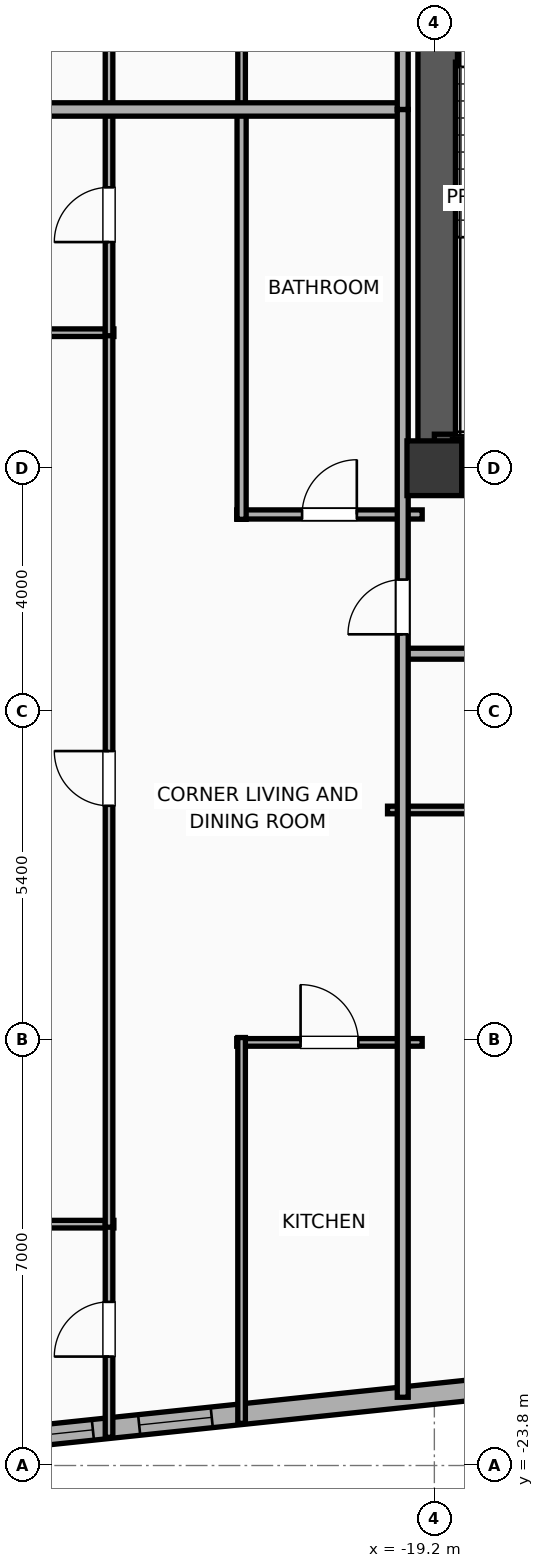
"""IFC4 building model, lengths in metres.
Left out: names, types, materials, properties, quantities, classifications, styles, units other than length and angle.
Written with IfcOpenShell. Run it as: python <this file> out.ifc"""

import sys

from ifc_helpers import new_model, si_unit, direction, frame, frame_2d, origin, origin_2d, place, context, subcontext, project, spatial, rectangle, extrude, element, fill, save


model = new_model("IFC4")
c1 = context("Model", 3, precision=1e-05, world=origin(), true_north=direction((0.0, 1.0)))
c2 = subcontext(c1, "Body", "Model", "MODEL_VIEW")
j1 = project(units=[si_unit("LENGTHUNIT", "METRE"), si_unit("PLANEANGLEUNIT", "RADIAN")], contexts=[c1])
p1 = place(None, origin())
s1 = spatial("IfcSite", under=j1, at=p1, CompositionType="ELEMENT")
p2 = place(p1, origin())
s2 = spatial("IfcBuilding", under=s1, at=p2, CompositionType="ELEMENT")
p3 = place(p2, frame((0.0, 0.0, 163.8)))
s3 = spatial("IfcBuildingStorey", under=s2, at=p3, CompositionType="ELEMENT", Elevation=163.8)
p4 = place(p3, frame((-19.2, -7.4, 0.0), z_axis=(0.0, 0.0, 1.0), x_axis=(1.0, 0.0, 0.0)))
e1 = element("IfcColumn", 1, at=p4, inside=s3, PredefinedType="COLUMN", context=c2, shape_type="SweptSolid", body=[
    extrude(rectangle(XDim=0.9, YDim=0.9, at=origin_2d()), origin(), (0.0, 0.0, 1.0), 3.9),
])
p5 = place(p3, frame((-19.425, -7.4, 0.0), z_axis=(0.0, 0.0, 1.0), x_axis=(1.0, 0.0, 0.0)))
e2 = element("IfcWall", 2, at=p5, inside=s3, PredefinedType="SHEAR", context=c2, shape_type="SweptSolid", body=[
    extrude(rectangle(XDim=7.25, YDim=0.45, at=frame_2d((3.625, 0.0))), origin(), (0.0, 0.0, 1.0), 3.65),
])
p6 = place(p3, frame((-19.145, -7.4, 0.0), z_axis=(0.0, 0.0, 1.0), x_axis=(0.0, 1.0, 0.0)))
e3 = element("IfcWall", 3, at=p6, inside=s3, PredefinedType="SHEAR", context=c2, shape_type="SweptSolid", body=[
    extrude(rectangle(XDim=14.8, YDim=0.65, at=frame_2d((7.4, 0.0))), origin(), (0.0, 0.0, 1.0), 3.65),
])
p7 = place(p3, frame((-19.2, -6.965, 0.0), z_axis=(0.0, 0.0, 1.0), x_axis=(1.0, 0.0, 0.0)))
e4 = element("IfcWall", 4, at=p7, inside=s3, PredefinedType="SOLIDWALL", context=c2, shape_type="SweptSolid", body=[
    extrude(rectangle(XDim=3.46, YDim=0.25, at=frame_2d((1.73, 0.0))), origin(), (0.0, 0.0, 1.0), 3.65),
])
p8 = place(p3, frame((24.756, -18.003, 0.0), z_axis=(0.0, 0.0, 1.0), x_axis=(-0.99452160744, -0.104531202687, 0.0)))
e5 = element("IfcWall", 5, at=p8, inside=s3, PredefinedType="ELEMENTEDWALL", context=c2, shape_type="SweptSolid", body=[
    extrude(rectangle(XDim=51.967, YDim=0.34, at=frame_2d((25.983, 0.0))), origin(), (0.0, 0.0, 1.0), 3.65),
])
p9 = place(p8, frame((25.633, 0.0, 0.75)))
e6 = element("IfcOpeningElement", 6, at=p9, cuts=e5, PredefinedType="OPENING", context=c2, shape_type="SweptSolid", body=[
    extrude(rectangle(XDim=2.4, YDim=2.1, at=frame_2d((1.2, 1.05))), frame((0.0, 0.18, 0.0), z_axis=(0.0, -1.0, 0.0), x_axis=(1.0, 0.0, 0.0)), (0.0, 0.0, 1.0), 0.36),
])
p10 = place(p8, frame((42.369, 0.0, 0.75)))
e7 = element("IfcOpeningElement", 7, at=p10, cuts=e5, PredefinedType="OPENING", context=c2, shape_type="SweptSolid", body=[
    extrude(rectangle(XDim=1.2, YDim=2.05, at=frame_2d((0.6, 1.025))), frame((0.0, 0.18, 0.0), z_axis=(0.0, -1.0, 0.0), x_axis=(1.0, 0.0, 0.0)), (0.0, 0.0, 1.0), 0.36),
])
p11 = place(p8, frame((34.085, 0.0, 0.75)))
e8 = element("IfcOpeningElement", 8, at=p11, cuts=e5, PredefinedType="OPENING", context=c2, shape_type="SweptSolid", body=[
    extrude(rectangle(XDim=1.2, YDim=2.05, at=frame_2d((0.6, 1.025))), frame((0.0, 0.18, 0.0), z_axis=(0.0, -1.0, 0.0), x_axis=(1.0, 0.0, 0.0)), (0.0, 0.0, 1.0), 0.36),
])
p12 = place(p8, frame((36.993, 0.0, 0.75)))
e9 = element("IfcOpeningElement", 9, at=p12, cuts=e5, PredefinedType="OPENING", context=c2, shape_type="SweptSolid", body=[
    extrude(rectangle(XDim=1.2, YDim=2.05, at=frame_2d((0.6, 1.025))), frame((0.0, 0.18, 0.0), z_axis=(0.0, -1.0, 0.0), x_axis=(1.0, 0.0, 0.0)), (0.0, 0.0, 1.0), 0.36),
])
p13 = place(p8, frame((14.397, 0.0, 0.75)))
e10 = element("IfcOpeningElement", 10, at=p13, cuts=e5, PredefinedType="OPENING", context=c2, shape_type="SweptSolid", body=[
    extrude(rectangle(XDim=1.2, YDim=2.05, at=frame_2d((0.6, 1.025))), frame((0.0, 0.18, 0.0), z_axis=(0.0, -1.0, 0.0), x_axis=(1.0, 0.0, 0.0)), (0.0, 0.0, 1.0), 0.36),
])
p14 = place(p8, frame((11.489, 0.0, 0.75)))
e11 = element("IfcOpeningElement", 11, at=p14, cuts=e5, PredefinedType="OPENING", context=c2, shape_type="SweptSolid", body=[
    extrude(rectangle(XDim=1.2, YDim=2.05, at=frame_2d((0.6, 1.025))), frame((0.0, 0.18, 0.0), z_axis=(0.0, -1.0, 0.0), x_axis=(1.0, 0.0, 0.0)), (0.0, 0.0, 1.0), 0.36),
])
p15 = place(p8, frame((8.521, 0.0, 0.75)))
e12 = element("IfcOpeningElement", 12, at=p15, cuts=e5, PredefinedType="OPENING", context=c2, shape_type="SweptSolid", body=[
    extrude(rectangle(XDim=1.2, YDim=2.05, at=frame_2d((0.6, 1.025))), frame((0.0, 0.18, 0.0), z_axis=(0.0, -1.0, 0.0), x_axis=(1.0, 0.0, 0.0)), (0.0, 0.0, 1.0), 0.36),
])
p16 = place(p8, frame((5.582, 0.0, 0.75)))
e13 = element("IfcOpeningElement", 13, at=p16, cuts=e5, PredefinedType="OPENING", context=c2, shape_type="SweptSolid", body=[
    extrude(rectangle(XDim=1.2, YDim=2.05, at=frame_2d((0.6, 1.025))), frame((0.0, 0.18, 0.0), z_axis=(0.0, -1.0, 0.0), x_axis=(1.0, 0.0, 0.0)), (0.0, 0.0, 1.0), 0.36),
])
p17 = place(p8, frame((29.313, 0.0, 0.75)))
e14 = element("IfcOpeningElement", 14, at=p17, cuts=e5, PredefinedType="OPENING", context=c2, shape_type="SweptSolid", body=[
    extrude(rectangle(XDim=1.2, YDim=2.05, at=frame_2d((0.6, 1.025))), frame((0.0, 0.18, 0.0), z_axis=(0.0, -1.0, 0.0), x_axis=(1.0, 0.0, 0.0)), (0.0, 0.0, 1.0), 0.36),
])
p18 = place(p8, frame((22.248, 0.0, 0.75)))
e15 = element("IfcOpeningElement", 15, at=p18, cuts=e5, PredefinedType="OPENING", context=c2, shape_type="SweptSolid", body=[
    extrude(rectangle(XDim=1.2, YDim=2.05, at=frame_2d((0.6, 1.025))), frame((0.0, 0.18, 0.0), z_axis=(0.0, -1.0, 0.0), x_axis=(1.0, 0.0, 0.0)), (0.0, 0.0, 1.0), 0.36),
])
p19 = place(p8, frame((18.186, 0.0, 0.75)))
e16 = element("IfcOpeningElement", 16, at=p19, cuts=e5, PredefinedType="OPENING", context=c2, shape_type="SweptSolid", body=[
    extrude(rectangle(XDim=1.2, YDim=2.05, at=frame_2d((0.6, 1.025))), frame((0.0, 0.18, 0.0), z_axis=(0.0, -1.0, 0.0), x_axis=(1.0, 0.0, 0.0)), (0.0, 0.0, 1.0), 0.36),
])
p20 = place(p8, frame((47.879, 0.0, 0.75)))
e17 = element("IfcOpeningElement", 17, at=p20, cuts=e5, PredefinedType="OPENING", context=c2, shape_type="SweptSolid", body=[
    extrude(rectangle(XDim=1.2, YDim=2.05, at=frame_2d((0.6, 1.025))), frame((0.0, 0.18, 0.0), z_axis=(0.0, -1.0, 0.0), x_axis=(1.0, 0.0, 0.0)), (0.0, 0.0, 1.0), 0.36),
])
p21 = place(p8, frame((49.844, 0.0, 0.75)))
e18 = element("IfcOpeningElement", 18, at=p21, cuts=e5, PredefinedType="OPENING", context=c2, shape_type="SweptSolid", body=[
    extrude(rectangle(XDim=1.2, YDim=2.05, at=frame_2d((0.6, 1.025))), frame((0.0, 0.18, 0.0), z_axis=(0.0, -1.0, 0.0), x_axis=(1.0, 0.0, 0.0)), (0.0, 0.0, 1.0), 0.36),
])
p22 = place(p3, frame((-19.97, -13.02, 0.0), z_axis=(0.0, 0.0, 1.0), x_axis=(1.0, 0.0, 0.0)))
e19 = element("IfcWall", 19, at=p22, inside=s3, PredefinedType="PARTITIONING", context=c2, shape_type="SweptSolid", body=[
    extrude(rectangle(XDim=2.63, YDim=0.125, at=frame_2d((1.315, 0.0))), origin(), (0.0, 0.0, 1.0), 3.65),
])
p23 = place(p3, frame((-19.75, -10.45, 0.0), z_axis=(0.0, 0.0, 1.0), x_axis=(1.0, 0.0, 0.0)))
e20 = element("IfcWall", 20, at=p23, inside=s3, PredefinedType="PARTITIONING", context=c2, shape_type="SweptSolid", body=[
    extrude(rectangle(XDim=11.67, YDim=0.18, at=frame_2d((5.835, 0.0))), origin(), (0.0, 0.0, 1.0), 3.65),
])
p24 = place(p23, frame((2.664, 0.0, 0.0)))
e21 = element("IfcOpeningElement", 21, at=p24, cuts=e20, PredefinedType="OPENING", context=c2, shape_type="SweptSolid", body=[
    extrude(rectangle(XDim=0.9, YDim=2.05, at=frame_2d((0.45, 1.025))), frame((0.0, 0.1, 0.0), z_axis=(0.0, -1.0, 0.0), x_axis=(1.0, 0.0, 0.0)), (0.0, 0.0, 1.0), 0.2),
])
p25 = place(p23, frame((9.404, 0.0, 0.0)))
e22 = element("IfcOpeningElement", 22, at=p25, cuts=e20, PredefinedType="OPENING", context=c2, shape_type="SweptSolid", body=[
    extrude(rectangle(XDim=1.15, YDim=2.05, at=frame_2d((0.575, 1.025))), frame((0.0, 0.1, 0.0), z_axis=(0.0, -1.0, 0.0), x_axis=(1.0, 0.0, 0.0)), (0.0, 0.0, 1.0), 0.2),
])
p26 = place(p3, frame((-31.123, -19.831, 0.0), z_axis=(0.0, 0.0, 1.0), x_axis=(1.0, 0.0, 0.0)))
e23 = element("IfcWall", 23, at=p26, inside=s3, PredefinedType="PARTITIONING", context=c2, shape_type="SweptSolid", body=[
    extrude(rectangle(XDim=6.653, YDim=0.125, at=frame_2d((3.326, 0.0))), origin(), (0.0, 0.0, 1.0), 3.65),
])
p27 = place(p3, frame((-32.664, -5.171, 0.0), z_axis=(0.0, 0.0, 1.0), x_axis=(1.0, 0.0, 0.0)))
e24 = element("IfcWall", 24, at=p27, inside=s3, PredefinedType="PARTITIONING", context=c2, shape_type="SweptSolid", body=[
    extrude(rectangle(XDim=8.194, YDim=0.125, at=frame_2d((4.097, 0.0))), origin(), (0.0, 0.0, 1.0), 3.65),
])
p28 = place(p3, frame((-24.55, -23.336, 0.0), z_axis=(0.0, 0.0, 1.0), x_axis=(0.0, 1.0, 0.0)))
e25 = element("IfcWall", 25, at=p28, inside=s3, PredefinedType="PARTITIONING", context=c2, shape_type="SweptSolid", body=[
    extrude(rectangle(XDim=3.555, YDim=0.125, at=frame_2d((1.778, 0.0))), origin(), (0.0, 0.0, 1.0), 3.65),
])
p29 = place(p28, frame((1.328, 0.0, 0.0)))
e26 = element("IfcOpeningElement", 26, at=p29, cuts=e25, PredefinedType="OPENING", context=c2, shape_type="SweptSolid", body=[
    extrude(rectangle(XDim=0.9, YDim=2.05, at=frame_2d((0.45, 1.025))), frame((0.0, 0.073, 0.0), z_axis=(0.0, -1.0, 0.0), x_axis=(1.0, 0.0, 0.0)), (0.0, 0.0, 1.0), 0.145),
])
p30 = place(p3, frame((-24.55, -19.881, 0.0), z_axis=(0.0, 0.0, 1.0), x_axis=(0.0, 1.0, 0.0)))
e27 = element("IfcWall", 27, at=p30, inside=s3, PredefinedType="PARTITIONING", context=c2, shape_type="SweptSolid", body=[
    extrude(rectangle(XDim=14.76, YDim=0.125, at=frame_2d((7.38, 0.0))), origin(), (0.0, 0.0, 1.0), 3.65),
])
p31 = place(p30, frame((6.93, 0.0, 0.0)))
e28 = element("IfcOpeningElement", 28, at=p31, cuts=e27, PredefinedType="OPENING", context=c2, shape_type="SweptSolid", body=[
    extrude(rectangle(XDim=0.9, YDim=2.05, at=frame_2d((0.45, 1.025))), frame((0.0, 0.073, 0.0), z_axis=(0.0, -1.0, 0.0), x_axis=(1.0, 0.0, 0.0)), (0.0, 0.0, 1.0), 0.145),
])
p32 = place(p3, frame((-24.55, -5.221, 0.0), z_axis=(0.0, 0.0, 1.0), x_axis=(0.0, 1.0, 0.0)))
e29 = element("IfcWall", 29, at=p32, inside=s3, PredefinedType="PARTITIONING", context=c2, shape_type="SweptSolid", body=[
    extrude(rectangle(XDim=3.783, YDim=0.125, at=frame_2d((1.892, 0.0))), origin(), (0.0, 0.0, 1.0), 3.65),
])
p33 = place(p32, frame((1.541, 0.0, 0.0)))
e30 = element("IfcOpeningElement", 30, at=p33, cuts=e29, PredefinedType="OPENING", context=c2, shape_type="SweptSolid", body=[
    extrude(rectangle(XDim=0.9, YDim=2.05, at=frame_2d((0.45, 1.025))), frame((0.0, 0.073, 0.0), z_axis=(0.0, -1.0, 0.0), x_axis=(1.0, 0.0, 0.0)), (0.0, 0.0, 1.0), 0.145),
])
p34 = place(p3, frame((-22.45, -16.842, 0.0), z_axis=(0.0, 0.0, 1.0), x_axis=(1.0, 0.0, 0.0)))
e31 = element("IfcWall", 31, at=p34, inside=s3, PredefinedType="PARTITIONING", context=c2, shape_type="SweptSolid", body=[
    extrude(rectangle(XDim=3.05, YDim=0.125, at=frame_2d((1.525, 0.0))), origin(), (0.0, 0.0, 1.0), 3.65),
])
p35 = place(p34, frame((1.05, 0.0, 0.0)))
e32 = element("IfcOpeningElement", 32, at=p35, cuts=e31, PredefinedType="OPENING", context=c2, shape_type="SweptSolid", body=[
    extrude(rectangle(XDim=0.95, YDim=2.05, at=frame_2d((0.475, 1.025))), frame((0.0, 0.073, 0.0), z_axis=(0.0, -1.0, 0.0), x_axis=(1.0, 0.0, 0.0)), (0.0, 0.0, 1.0), 0.145),
])
p36 = place(p3, frame((-22.45, -8.16, 0.0), z_axis=(0.0, 0.0, 1.0), x_axis=(1.0, 0.0, 0.0)))
e33 = element("IfcWall", 33, at=p36, inside=s3, PredefinedType="PLUMBINGWALL", context=c2, shape_type="SweptSolid", body=[
    extrude(rectangle(XDim=3.05, YDim=0.15, at=frame_2d((1.525, 0.0))), origin(), (0.0, 0.0, 1.0), 3.04),
])
p37 = place(p36, frame((1.075, 0.0, 0.0)))
e34 = element("IfcOpeningElement", 34, at=p37, cuts=e33, PredefinedType="OPENING", context=c2, shape_type="SweptSolid", body=[
    extrude(rectangle(XDim=0.9, YDim=2.05, at=frame_2d((0.45, 1.025))), frame((0.0, 0.085, 0.0), z_axis=(0.0, -1.0, 0.0), x_axis=(1.0, 0.0, 0.0)), (0.0, 0.0, 1.0), 0.17),
])
p38 = place(p3, frame((-22.37, -23.107, 0.0), z_axis=(0.0, 0.0, 1.0), x_axis=(0.0, 1.0, 0.0)))
e35 = element("IfcWall", 35, at=p38, inside=s3, PredefinedType="PARTITIONING", context=c2, shape_type="SweptSolid", body=[
    extrude(rectangle(XDim=6.345, YDim=0.125, at=frame_2d((3.173, 0.0))), origin(), (0.0, 0.0, 1.0), 3.65),
])
p39 = place(p3, frame((-22.37, -8.24, 0.0), z_axis=(0.0, 0.0, 1.0), x_axis=(0.0, 1.0, 0.0)))
e36 = element("IfcWall", 36, at=p39, inside=s3, PredefinedType="PLUMBINGWALL", context=c2, shape_type="SweptSolid", body=[
    extrude(rectangle(XDim=6.72, YDim=0.15, at=frame_2d((3.36, 0.0))), origin(), (0.0, 0.0, 1.0), 3.65),
])
p40 = place(p3, frame((-24.55, -1.562, 0.0), z_axis=(0.0, 0.0, 1.0), x_axis=(0.0, 1.0, 0.0)))
e37 = element("IfcWall", 37, at=p40, inside=s3, PredefinedType="PARTITIONING", context=c2, shape_type="SweptSolid", body=[
    extrude(rectangle(XDim=3.335, YDim=0.125, at=frame_2d((1.668, 0.0))), origin(), (0.0, 0.0, 1.0), 3.65),
])
p41 = place(p40, frame((1.119, 0.0, 0.0)))
e38 = element("IfcOpeningElement", 38, at=p41, cuts=e37, PredefinedType="OPENING", context=c2, shape_type="SweptSolid", body=[
    extrude(rectangle(XDim=0.9, YDim=2.05, at=frame_2d((0.45, 1.025))), frame((0.0, 0.073, 0.0), z_axis=(0.0, -1.0, 0.0), x_axis=(1.0, 0.0, 0.0)), (0.0, 0.0, 1.0), 0.145),
])
p42 = place(p3, frame((-22.37, -1.48, 0.0), z_axis=(0.0, 0.0, 1.0), x_axis=(0.0, 1.0, 0.0)))
e39 = element("IfcWall", 39, at=p42, inside=s3, PredefinedType="PARTITIONING", context=c2, shape_type="SweptSolid", body=[
    extrude(rectangle(XDim=6.72, YDim=0.125, at=frame_2d((3.36, 0.0))), origin(), (0.0, 0.0, 1.0), 3.65),
])
p43 = place(p3, frame((-19.72, -1.5, 0.0), z_axis=(0.0, 0.0, 1.0), x_axis=(-1.0, 0.0, 0.0)))
e40 = element("IfcWall", 40, at=p43, inside=s3, PredefinedType="PARTITIONING", context=c2, shape_type="SweptSolid", body=[
    extrude(rectangle(XDim=13.179, YDim=0.22, at=frame_2d((6.589, 0.0))), origin(), (0.0, 0.0, 1.0), 3.65),
])
p44 = place(p3, frame((-19.72, -22.678, 0.0), z_axis=(0.0, 0.0, 1.0), x_axis=(0.0, 1.0, 0.0)))
e41 = element("IfcWall", 41, at=p44, inside=s3, PredefinedType="PARTITIONING", context=c2, shape_type="SweptSolid", body=[
    extrude(rectangle(XDim=21.178, YDim=0.18, at=frame_2d((10.589, 0.0))), origin(), (0.0, 0.0, 1.0), 3.65),
])
p45 = place(p44, frame((12.547, 0.0, 0.0)))
e42 = element("IfcOpeningElement", 42, at=p45, cuts=e41, PredefinedType="OPENING", context=c2, shape_type="SweptSolid", body=[
    extrude(rectangle(XDim=0.9, YDim=2.05, at=frame_2d((0.45, 1.025))), frame((0.0, 0.1, 0.0), z_axis=(0.0, -1.0, 0.0), x_axis=(1.0, 0.0, 0.0)), (0.0, 0.0, 1.0), 0.2),
])
p46 = place(p3, frame((-19.72, -1.5, 0.0), z_axis=(0.0, 0.0, 1.0), x_axis=(0.0, 1.0, 0.0)))
e43 = element("IfcWall", 43, at=p46, inside=s3, PredefinedType="PARTITIONING", context=c2, shape_type="SweptSolid", body=[
    extrude(rectangle(XDim=19.505, YDim=0.18, at=frame_2d((9.752, 0.0))), origin(), (0.0, 0.0, 1.0), 3.04),
])
p47 = place(p46, frame((10.73, 0.0, 0.0)))
e44 = element("IfcOpeningElement", 44, at=p47, cuts=e43, PredefinedType="OPENING", context=c2, shape_type="SweptSolid", body=[
    extrude(rectangle(XDim=0.9, YDim=2.05, at=frame_2d((0.45, 1.025))), frame((0.0, 0.1, 0.0), z_axis=(0.0, -1.0, 0.0), x_axis=(1.0, 0.0, 0.0)), (0.0, 0.0, 1.0), 0.2),
])
p48 = place(p20, origin())
e45 = element("IfcWindow", 45, at=p48, inside=s3, PartitioningType="SINGLE_PANEL", PredefinedType="WINDOW", context=c2, shape_type="SweptSolid", body=[
    extrude(rectangle(XDim=1.2, YDim=2.05, at=frame_2d((0.6, 1.025))), frame((0.0, 0.03, 0.0), z_axis=(0.0, -1.0, 0.0), x_axis=(1.0, 0.0, 0.0)), (0.0, 0.0, 1.0), 0.06),
])
fill(e17, e45)
p49 = place(p21, origin())
e46 = element("IfcWindow", 46, at=p49, inside=s3, PartitioningType="SINGLE_PANEL", PredefinedType="WINDOW", context=c2, shape_type="SweptSolid", body=[
    extrude(rectangle(XDim=1.2, YDim=2.05, at=frame_2d((0.6, 1.025))), frame((0.0, 0.03, 0.0), z_axis=(0.0, -1.0, 0.0), x_axis=(1.0, 0.0, 0.0)), (0.0, 0.0, 1.0), 0.06),
])
fill(e18, e46)
p50 = place(p29, origin())
e47 = element("IfcDoor", 47, at=p50, inside=s3, OperationType="SINGLE_SWING_LEFT", PredefinedType="DOOR", context=c2, shape_type="SweptSolid", body=[
    extrude(rectangle(XDim=0.9, YDim=2.05, at=frame_2d((0.45, 1.025))), frame((0.0, 0.025, 0.0), z_axis=(0.0, -1.0, 0.0), x_axis=(1.0, 0.0, 0.0)), (0.0, 0.0, 1.0), 0.05),
])
fill(e26, e47)
p51 = place(p31, origin())
e48 = element("IfcDoor", 48, at=p51, inside=s3, OperationType="SINGLE_SWING_RIGHT", PredefinedType="DOOR", context=c2, shape_type="SweptSolid", body=[
    extrude(rectangle(XDim=0.9, YDim=2.05, at=frame_2d((0.45, 1.025))), frame((0.0, 0.025, 0.0), z_axis=(0.0, -1.0, 0.0), x_axis=(1.0, 0.0, 0.0)), (0.0, 0.0, 1.0), 0.05),
])
fill(e28, e48)
p52 = place(p33, origin())
e49 = element("IfcDoor", 49, at=p52, inside=s3, OperationType="SINGLE_SWING_LEFT", PredefinedType="DOOR", context=c2, shape_type="SweptSolid", body=[
    extrude(rectangle(XDim=0.9, YDim=2.05, at=frame_2d((0.45, 1.025))), frame((0.0, 0.025, 0.0), z_axis=(0.0, -1.0, 0.0), x_axis=(1.0, 0.0, 0.0)), (0.0, 0.0, 1.0), 0.05),
])
fill(e30, e49)
p53 = place(p35, origin())
e50 = element("IfcDoor", 50, at=p53, inside=s3, OperationType="SINGLE_SWING_LEFT", PredefinedType="DOOR", context=c2, shape_type="SweptSolid", body=[
    extrude(rectangle(XDim=0.95, YDim=2.05, at=frame_2d((0.475, 1.025))), frame((0.0, 0.025, 0.0), z_axis=(0.0, -1.0, 0.0), x_axis=(1.0, 0.0, 0.0)), (0.0, 0.0, 1.0), 0.05),
])
fill(e32, e50)
p54 = place(p37, origin())
e51 = element("IfcDoor", 51, at=p54, inside=s3, OperationType="SINGLE_SWING_RIGHT", PredefinedType="DOOR", context=c2, shape_type="SweptSolid", body=[
    extrude(rectangle(XDim=0.9, YDim=2.05, at=frame_2d((0.45, 1.025))), frame((0.0, 0.025, 0.0), z_axis=(0.0, -1.0, 0.0), x_axis=(1.0, 0.0, 0.0)), (0.0, 0.0, 1.0), 0.05),
])
fill(e34, e51)
p55 = place(p45, origin())
e52 = element("IfcDoor", 52, at=p55, inside=s3, OperationType="SINGLE_SWING_LEFT", PredefinedType="DOOR", context=c2, shape_type="SweptSolid", body=[
    extrude(rectangle(XDim=0.9, YDim=2.05, at=frame_2d((0.45, 1.025))), frame((0.0, 0.025, 0.0), z_axis=(0.0, -1.0, 0.0), x_axis=(1.0, 0.0, 0.0)), (0.0, 0.0, 1.0), 0.05),
])
fill(e42, e52)
save(model, sys.argv[1])
